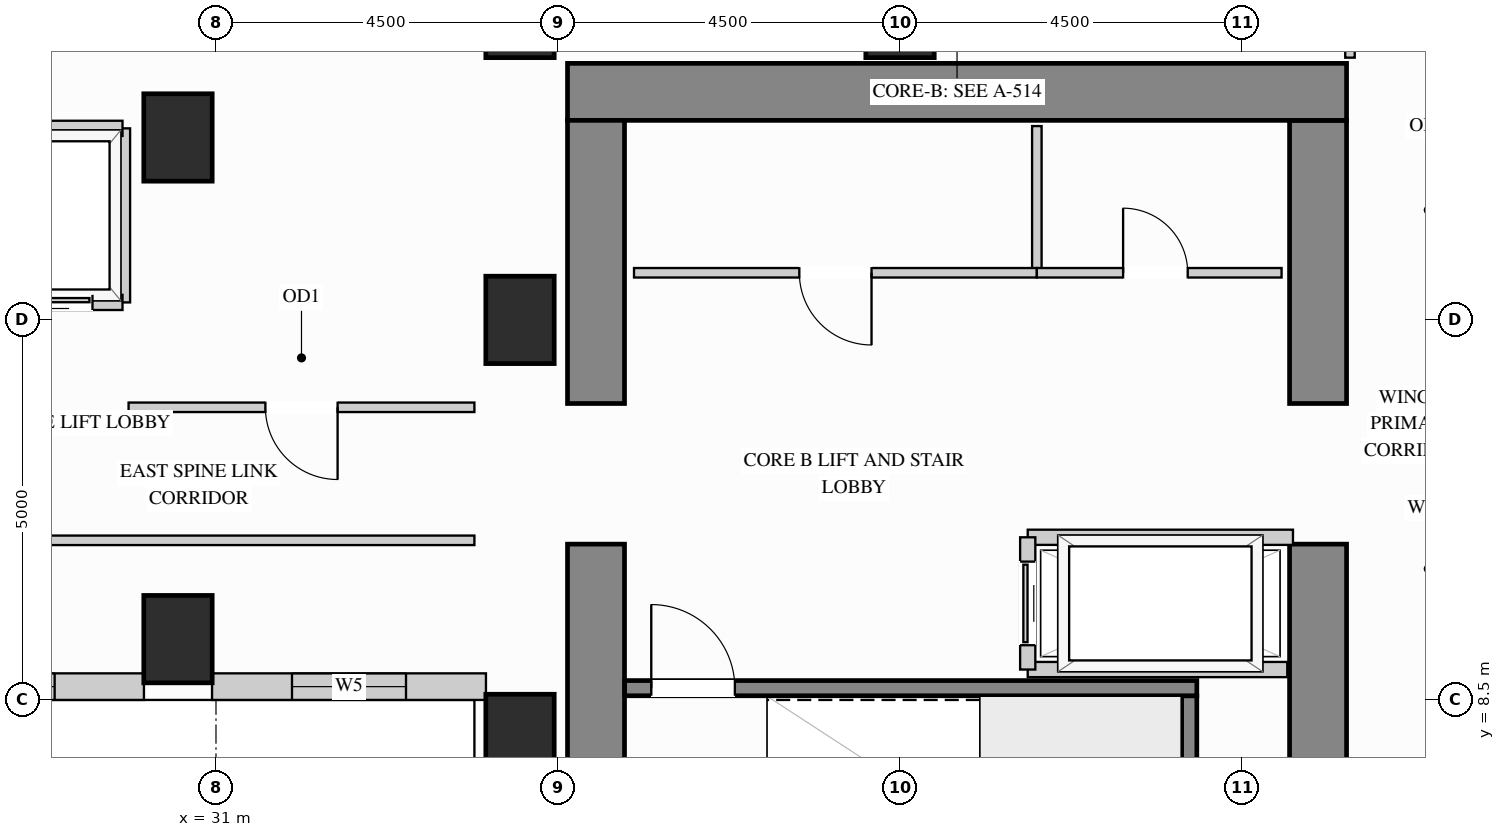
"""IFC4 building model, lengths in metres.
Left out: names, types, materials, properties, quantities, classifications, styles, units other than length and angle.
Written with IfcOpenShell. Run it as: python <this file> out.ifc"""

import sys

from ifc_helpers import new_model, si_unit, direction, frame, frame_2d, origin, origin_2d, place, context, subcontext, project, spatial, rectangle, extrude, source, transform, mapped, element, fill, save


model = new_model("IFC4")
c1 = context("Model", 3, precision=1e-05, world=origin(), true_north=direction((0.0, 1.0)))
c2 = subcontext(c1, "Body", "Model", "MODEL_VIEW")
j1 = project(units=[si_unit("LENGTHUNIT", "METRE"), si_unit("PLANEANGLEUNIT", "RADIAN")], contexts=[c1])
p1 = place(None, origin())
s1 = spatial("IfcSite", under=j1, at=p1, CompositionType="ELEMENT")
p2 = place(p1, origin())
s2 = spatial("IfcBuilding", under=s1, at=p2, CompositionType="ELEMENT")
p3 = place(p2, frame((0.0, 0.0, 131.4)))
s3 = spatial("IfcBuildingStorey", under=s2, at=p3, CompositionType="ELEMENT", Elevation=131.4)
m1 = source(origin(), c2, "Body", "SweptSolid", [
    extrude(rectangle(XDim=0.9, YDim=0.9, at=origin_2d()), origin(), (0.0, 0.0, 1.0), 3.38),
])
for number, where, z_axis, x_axis in (
    (1, (35.0, 17.4, 0.0), (0.0, 0.0, 1.0), (1.0, 0.0, 0.0)),
    (2, (40.0, 17.4, 0.0), (0.0, 0.0, 1.0), (1.0, 0.0, 0.0)),
):
    element("IfcColumn", number, at=place(p3, frame(where, z_axis=z_axis, x_axis=x_axis)), inside=s3, PredefinedType="COLUMN", context=c2, shape_type="MappedRepresentation", body=[
        mapped(m1, transform((0.0, 0.0, 0.0), x_axis=(1.0, 0.0, 0.0), y_axis=(0.0, 1.0, 0.0), z_axis=(0.0, 0.0, 1.0))),
    ])
m2 = source(origin(), c2, "Body", "SweptSolid", [
    extrude(rectangle(XDim=0.9, YDim=1.15, at=origin_2d()), origin(), (0.0, 0.0, 1.0), 3.38),
])
for number, where, z_axis, x_axis in (
    (3, (35.0, 13.5, 0.0), (0.0, 0.0, 1.0), (1.0, 0.0, 0.0)),
    (4, (35.0, 8.0, 0.0), (0.0, 0.0, 1.0), (1.0, 0.0, 0.0)),
    (5, (30.5, 15.9, 0.0), (0.0, 0.0, 1.0), (1.0, 0.0, 0.0)),
    (6, (30.5, 9.3, 0.0), (0.0, 0.0, 1.0), (1.0, 0.0, 0.0)),
):
    element("IfcColumn", number, at=place(p3, frame(where, z_axis=z_axis, x_axis=x_axis)), inside=s3, PredefinedType="COLUMN", context=c2, shape_type="MappedRepresentation", body=[
        mapped(m2, transform((0.0, 0.0, 0.0), x_axis=(1.0, 0.0, 0.0), y_axis=(0.0, 1.0, 0.0), z_axis=(0.0, 0.0, 1.0))),
    ])
m3 = source(origin(), c2, "Body", "SweptSolid", [
    extrude(rectangle(XDim=5.675, YDim=0.75, at=frame_2d((2.837, 0.0))), origin(), (0.0, 0.0, 1.0), 3.38),
])
p4 = place(p3, frame((45.5, 4.875, 0.0), z_axis=(0.0, 0.0, 1.0), x_axis=(0.0, 1.0, 0.0)))
e7 = element("IfcWall", 7, at=p4, inside=s3, PredefinedType="SHEAR", context=c2, shape_type="MappedRepresentation", body=[
    mapped(m3, transform((0.0, 0.0, 0.0), x_axis=(1.0, 0.0, 0.0), y_axis=(0.0, 1.0, 0.0), z_axis=(0.0, 0.0, 1.0))),
])
m4 = source(origin(), c2, "Body", "SweptSolid", [
    extrude(rectangle(XDim=3.725, YDim=0.75, at=frame_2d((1.863, 0.0))), origin(), (0.0, 0.0, 1.0), 3.38),
])
p5 = place(p3, frame((45.5, 12.4, 0.0), z_axis=(0.0, 0.0, 1.0), x_axis=(0.0, 1.0, 0.0)))
e8 = element("IfcWall", 8, at=p5, inside=s3, PredefinedType="SHEAR", context=c2, shape_type="MappedRepresentation", body=[
    mapped(m4, transform((0.0, 0.0, 0.0), x_axis=(1.0, 0.0, 0.0), y_axis=(0.0, 1.0, 0.0), z_axis=(0.0, 0.0, 1.0))),
])
m5 = source(origin(), c2, "Body", "SweptSolid", [
    extrude(rectangle(XDim=10.25, YDim=0.75, at=frame_2d((5.125, 0.0))), origin(), (0.0, 0.0, 1.0), 3.38),
])
p6 = place(p3, frame((35.625, 16.5, 0.0), z_axis=(0.0, 0.0, 1.0), x_axis=(1.0, 0.0, 0.0)))
e9 = element("IfcWall", 9, at=p6, inside=s3, PredefinedType="SHEAR", context=c2, shape_type="MappedRepresentation", body=[
    mapped(m5, transform((0.0, 0.0, 0.0), x_axis=(1.0, 0.0, 0.0), y_axis=(0.0, 1.0, 0.0), z_axis=(0.0, 0.0, 1.0))),
])
p7 = place(p3, frame((36.0, 4.875, 0.0), z_axis=(0.0, 0.0, 1.0), x_axis=(0.0, 1.0, 0.0)))
e10 = element("IfcWall", 10, at=p7, inside=s3, PredefinedType="SHEAR", context=c2, shape_type="MappedRepresentation", body=[
    mapped(m3, transform((0.0, 0.0, 0.0), x_axis=(1.0, 0.0, 0.0), y_axis=(0.0, 1.0, 0.0), z_axis=(0.0, 0.0, 1.0))),
])
p8 = place(p3, frame((36.0, 12.4, 0.0), z_axis=(0.0, 0.0, 1.0), x_axis=(0.0, 1.0, 0.0)))
e11 = element("IfcWall", 11, at=p8, inside=s3, PredefinedType="SHEAR", context=c2, shape_type="MappedRepresentation", body=[
    mapped(m4, transform((0.0, 0.0, 0.0), x_axis=(1.0, 0.0, 0.0), y_axis=(0.0, 1.0, 0.0), z_axis=(0.0, 0.0, 1.0))),
])
p9 = place(p3, frame((23.848, 8.675, 0.0), z_axis=(0.0, 0.0, 1.0), x_axis=(1.0, 0.0, 0.0)))
e12 = element("IfcWall", 12, at=p9, inside=s3, PredefinedType="SOLIDWALL", context=c2, shape_type="SweptSolid", body=[
    extrude(rectangle(XDim=6.204, YDim=0.35, at=frame_2d((3.102, 0.0))), origin(), (0.0, 0.0, 1.0), 3.365),
])
p10 = place(p9, frame((1.175, 0.0, 0.78)))
e13 = element("IfcOpeningElement", 13, at=p10, cuts=e12, PredefinedType="OPENING", context=c2, shape_type="SweptSolid", body=[
    extrude(rectangle(XDim=1.5, YDim=2.0, at=frame_2d((0.75, 1.0))), frame((0.0, 0.185, 0.0), z_axis=(0.0, -1.0, 0.0), x_axis=(1.0, 0.0, 0.0)), (0.0, 0.0, 1.0), 0.37),
])
p11 = place(p9, frame((3.529, 0.0, 0.78)))
e14 = element("IfcOpeningElement", 14, at=p11, cuts=e12, PredefinedType="OPENING", context=c2, shape_type="SweptSolid", body=[
    extrude(rectangle(XDim=1.5, YDim=2.0, at=frame_2d((0.75, 1.0))), frame((0.0, 0.185, 0.0), z_axis=(0.0, -1.0, 0.0), x_axis=(1.0, 0.0, 0.0)), (0.0, 0.0, 1.0), 0.37),
])
p12 = place(p3, frame((30.948, 8.675, 0.0), z_axis=(0.0, 0.0, 1.0), x_axis=(1.0, 0.0, 0.0)))
e15 = element("IfcWall", 15, at=p12, inside=s3, PredefinedType="SOLIDWALL", context=c2, shape_type="SweptSolid", body=[
    extrude(rectangle(XDim=3.604, YDim=0.35, at=frame_2d((1.802, 0.0))), origin(), (0.0, 0.0, 1.0), 3.365),
])
p13 = place(p12, frame((1.052, 0.0, 0.78)))
e16 = element("IfcOpeningElement", 16, at=p13, cuts=e15, PredefinedType="OPENING", context=c2, shape_type="SweptSolid", body=[
    extrude(rectangle(XDim=1.5, YDim=2.0, at=frame_2d((0.75, 1.0))), frame((0.0, 0.185, 0.0), z_axis=(0.0, -1.0, 0.0), x_axis=(1.0, 0.0, 0.0)), (0.0, 0.0, 1.0), 0.37),
])
m6 = source(origin(), c2, "Body", "SweptSolid", [
    extrude(rectangle(XDim=1.93, YDim=0.125, at=frame_2d((0.965, 0.0))), origin(), (0.0, 0.0, 1.0), 3.365),
])
p14 = place(p3, frame((41.8, 14.12, 0.0), z_axis=(0.0, 0.0, 1.0), x_axis=(0.0, 1.0, 0.0)))
e17 = element("IfcWall", 17, at=p14, inside=s3, PredefinedType="PARTITIONING", context=c2, shape_type="MappedRepresentation", body=[
    mapped(m6, transform((0.0, 0.0, 0.0), x_axis=(1.0, 0.0, 0.0), y_axis=(0.0, 1.0, 0.0), z_axis=(0.0, 0.0, 1.0))),
])
p15 = place(p3, frame((36.5, 14.12, 0.0), z_axis=(0.0, 0.0, 1.0), x_axis=(1.0, 0.0, 0.0)))
e18 = element("IfcWall", 18, at=p15, inside=s3, PredefinedType="PARTITIONING", context=c2, shape_type="SweptSolid", body=[
    extrude(rectangle(XDim=5.3, YDim=0.125, at=frame_2d((2.65, 0.0))), origin(), (0.0, 0.0, 1.0), 3.365),
])
p16 = place(p15, frame((2.175, 0.0, 0.0)))
e19 = element("IfcOpeningElement", 19, at=p16, cuts=e18, PredefinedType="OPENING", context=c2, shape_type="SweptSolid", body=[
    extrude(rectangle(XDim=0.95, YDim=2.15, at=frame_2d((0.475, 1.075))), frame((0.0, 0.073, 0.0), z_axis=(0.0, -1.0, 0.0), x_axis=(1.0, 0.0, 0.0)), (0.0, 0.0, 1.0), 0.145),
])
p17 = place(p3, frame((41.8, 14.12, 0.0), z_axis=(0.0, 0.0, 1.0), x_axis=(1.0, 0.0, 0.0)))
e20 = element("IfcWall", 20, at=p17, inside=s3, PredefinedType="PARTITIONING", context=c2, shape_type="SweptSolid", body=[
    extrude(rectangle(XDim=3.22, YDim=0.125, at=frame_2d((1.61, 0.0))), origin(), (0.0, 0.0, 1.0), 3.365),
])
p18 = place(p17, frame((1.135, 0.0, 0.0)))
e21 = element("IfcOpeningElement", 21, at=p18, cuts=e20, PredefinedType="OPENING", context=c2, shape_type="SweptSolid", body=[
    extrude(rectangle(XDim=0.85, YDim=2.1, at=frame_2d((0.425, 1.05))), frame((0.0, 0.073, 0.0), z_axis=(0.0, -1.0, 0.0), x_axis=(1.0, 0.0, 0.0)), (0.0, 0.0, 1.0), 0.145),
])
p19 = place(p3, frame((45.92, 16.95, 0.0), z_axis=(0.0, 0.0, 1.0), x_axis=(0.0, 1.0, 0.0)))
e22 = element("IfcWall", 22, at=p19, inside=s3, PredefinedType="PARTITIONING", context=c2, shape_type="SweptSolid", body=[
    extrude(rectangle(XDim=2.9, YDim=0.125, at=frame_2d((1.45, 0.0))), origin(), (0.0, 0.0, 1.0), 3.365),
])
p20 = place(p19, frame((1.543, 0.0, 0.0)))
e23 = element("IfcOpeningElement", 23, at=p20, cuts=e22, PredefinedType="OPENING", context=c2, shape_type="SweptSolid", body=[
    extrude(rectangle(XDim=0.95, YDim=2.15, at=frame_2d((0.475, 1.075))), frame((0.0, 0.073, 0.0), z_axis=(0.0, -1.0, 0.0), x_axis=(1.0, 0.0, 0.0)), (0.0, 0.0, 1.0), 0.145),
])
p21 = place(p3, frame((29.85, 12.35, 0.0), z_axis=(0.0, 0.0, 1.0), x_axis=(1.0, 0.0, 0.0)))
e24 = element("IfcWall", 24, at=p21, inside=s3, PredefinedType="PARTITIONING", context=c2, shape_type="SweptSolid", body=[
    extrude(rectangle(XDim=4.55, YDim=0.125, at=frame_2d((2.275, 0.0))), origin(), (0.0, 0.0, 1.0), 3.365),
])
p22 = place(p21, frame((1.8, 0.0, 0.0)))
e25 = element("IfcOpeningElement", 25, at=p22, cuts=e24, PredefinedType="OPENING", context=c2, shape_type="SweptSolid", body=[
    extrude(rectangle(XDim=0.95, YDim=2.15, at=frame_2d((0.475, 1.075))), frame((0.0, 0.073, 0.0), z_axis=(0.0, -1.0, 0.0), x_axis=(1.0, 0.0, 0.0)), (0.0, 0.0, 1.0), 0.145),
])
p23 = place(p3, frame((19.5, 10.6, 0.0), z_axis=(0.0, 0.0, 1.0), x_axis=(1.0, 0.0, 0.0)))
e26 = element("IfcWall", 26, at=p23, inside=s3, PredefinedType="PARTITIONING", context=c2, shape_type="SweptSolid", body=[
    extrude(rectangle(XDim=14.9, YDim=0.125, at=frame_2d((7.45, 0.0))), origin(), (0.0, 0.0, 1.0), 3.365),
])
p24 = place(p23, frame((6.975, 0.0, 0.0)))
e27 = element("IfcOpeningElement", 27, at=p24, cuts=e26, PredefinedType="OPENING", context=c2, shape_type="SweptSolid", body=[
    extrude(rectangle(XDim=0.95, YDim=2.15, at=frame_2d((0.475, 1.075))), frame((0.0, 0.073, 0.0), z_axis=(0.0, -1.0, 0.0), x_axis=(1.0, 0.0, 0.0)), (0.0, 0.0, 1.0), 0.145),
])
m7 = source(origin(), c2, "Body", "SweptSolid", [
    extrude(rectangle(XDim=2.29, YDim=0.2, at=frame_2d((1.145, 0.0))), origin(), (0.0, 0.0, 1.0), 3.365),
])
p25 = place(p3, frame((29.77, 13.73, 0.0), z_axis=(0.0, 0.0, 1.0), x_axis=(0.0, 1.0, 0.0)))
e28 = element("IfcWall", 28, at=p25, inside=s3, PredefinedType="PARTITIONING", context=c2, shape_type="MappedRepresentation", body=[
    mapped(m7, transform((0.0, 0.0, 0.0), x_axis=(1.0, 0.0, 0.0), y_axis=(0.0, 1.0, 0.0), z_axis=(0.0, 0.0, 1.0))),
])
m8 = source(origin(), c2, "Body", "SweptSolid", [
    extrude(rectangle(XDim=1.89, YDim=0.2, at=frame_2d((0.945, 0.0))), origin(), (0.0, 0.0, 1.0), 2.677),
])
p26 = place(p3, frame((27.88, 16.02, 0.0), z_axis=(0.0, 0.0, 1.0), x_axis=(1.0, 0.0, 0.0)))
e29 = element("IfcWall", 29, at=p26, inside=s3, PredefinedType="PARTITIONING", context=c2, shape_type="MappedRepresentation", body=[
    mapped(m8, transform((0.0, 0.0, 0.0), x_axis=(1.0, 0.0, 0.0), y_axis=(0.0, 1.0, 0.0), z_axis=(0.0, 0.0, 1.0))),
])
p27 = place(p3, frame((27.88, 13.73, 0.0), z_axis=(0.0, 0.0, 1.0), x_axis=(1.0, 0.0, 0.0)))
e30 = element("IfcWall", 30, at=p27, inside=s3, PredefinedType="PARTITIONING", context=c2, shape_type="SweptSolid", body=[
    extrude(rectangle(XDim=1.89, YDim=0.2, at=frame_2d((0.945, 0.0))), origin(), (0.0, 0.0, 1.0), 2.446),
])
p28 = place(p27, frame((0.395, 0.0, 0.0)))
e31 = element("IfcOpeningElement", 31, at=p28, cuts=e30, PredefinedType="OPENING", context=c2, shape_type="SweptSolid", body=[
    extrude(rectangle(XDim=1.1, YDim=2.2, at=frame_2d((0.55, 1.1))), frame((0.0, 0.11, 0.0), z_axis=(0.0, -1.0, 0.0), x_axis=(1.0, 0.0, 0.0)), (0.0, 0.0, 1.0), 0.22),
])
m9 = source(origin(), c2, "Body", "SweptSolid", [
    extrude(rectangle(XDim=3.49, YDim=0.2, at=frame_2d((1.745, 0.0))), origin(), (0.0, 0.0, 1.0), 3.365),
])
p29 = place(p3, frame((41.68, 10.64, 0.0), z_axis=(0.0, 0.0, 1.0), x_axis=(1.0, 0.0, 0.0)))
e32 = element("IfcWall", 32, at=p29, inside=s3, PredefinedType="PARTITIONING", context=c2, shape_type="MappedRepresentation", body=[
    mapped(m9, transform((0.0, 0.0, 0.0), x_axis=(1.0, 0.0, 0.0), y_axis=(0.0, 1.0, 0.0), z_axis=(0.0, 0.0, 1.0))),
])
m10 = source(origin(), c2, "Body", "SweptSolid", [
    extrude(rectangle(XDim=3.415, YDim=0.2, at=frame_2d((1.708, 0.0))), origin(), (0.0, 0.0, 1.0), 3.365),
])
p30 = place(p3, frame((41.68, 8.9, 0.0), z_axis=(0.0, 0.0, 1.0), x_axis=(1.0, 0.0, 0.0)))
e33 = element("IfcWall", 33, at=p30, inside=s3, PredefinedType="PARTITIONING", context=c2, shape_type="MappedRepresentation", body=[
    mapped(m10, transform((0.0, 0.0, 0.0), x_axis=(1.0, 0.0, 0.0), y_axis=(0.0, 1.0, 0.0), z_axis=(0.0, 0.0, 1.0))),
])
p31 = place(p3, frame((41.68, 8.9, 0.0), z_axis=(0.0, 0.0, 1.0), x_axis=(0.0, 1.0, 0.0)))
e34 = element("IfcWall", 34, at=p31, inside=s3, PredefinedType="PARTITIONING", context=c2, shape_type="SweptSolid", body=[
    extrude(rectangle(XDim=1.74, YDim=0.2, at=frame_2d((0.87, 0.0))), origin(), (0.0, 0.0, 1.0), 3.365),
])
p32 = place(p31, frame((0.32, 0.0, 0.0)))
e35 = element("IfcOpeningElement", 35, at=p32, cuts=e34, PredefinedType="OPENING", context=c2, shape_type="SweptSolid", body=[
    extrude(rectangle(XDim=1.1, YDim=2.2, at=frame_2d((0.55, 1.1))), frame((0.0, 0.11, 0.0), z_axis=(0.0, -1.0, 0.0), x_axis=(1.0, 0.0, 0.0)), (0.0, 0.0, 1.0), 0.22),
])
m11 = source(origin(), c2, "Body", "SweptSolid", [
    extrude(rectangle(XDim=3.678, YDim=0.2, at=frame_2d((1.839, 0.0))), origin(), (0.0, 0.0, 1.0), 3.38),
])
p33 = place(p3, frame((43.805, 4.877, 0.0), z_axis=(0.0, 0.0, 1.0), x_axis=(0.0, 1.0, 0.0)))
e36 = element("IfcWall", 36, at=p33, inside=s3, PredefinedType="SHEAR", context=c2, shape_type="MappedRepresentation", body=[
    mapped(m11, transform((0.0, 0.0, 0.0), x_axis=(1.0, 0.0, 0.0), y_axis=(0.0, 1.0, 0.0), z_axis=(0.0, 0.0, 1.0))),
])
p34 = place(p3, frame((36.377, 8.655, 0.0), z_axis=(0.0, 0.0, 1.0), x_axis=(1.0, 0.0, 0.0)))
e37 = element("IfcWall", 37, at=p34, inside=s3, PredefinedType="SHEAR", context=c2, shape_type="SweptSolid", body=[
    extrude(rectangle(XDim=7.528, YDim=0.2, at=frame_2d((3.764, 0.0))), origin(), (0.0, 0.0, 1.0), 3.38),
])
p35 = place(p34, frame((0.35, 0.0, 0.0)))
e38 = element("IfcOpeningElement", 38, at=p35, cuts=e37, PredefinedType="OPENING", context=c2, shape_type="SweptSolid", body=[
    extrude(rectangle(XDim=1.1, YDim=2.15, at=frame_2d((0.55, 1.075))), frame((0.0, 0.11, 0.0), z_axis=(0.0, -1.0, 0.0), x_axis=(1.0, 0.0, 0.0)), (0.0, 0.0, 1.0), 0.22),
])
m12 = source(origin(), c2, "Body", "SweptSolid", [
    extrude(rectangle(XDim=1.1, YDim=2.2, at=frame_2d((0.55, 1.1))), frame((0.0, 0.025, 0.0), z_axis=(0.0, -1.0, 0.0), x_axis=(1.0, 0.0, 0.0)), (0.0, 0.0, 1.0), 0.05),
])
p36 = place(p28, origin())
e39 = element("IfcDoor", 39, at=p36, inside=s3, OperationType="SLIDING_TO_LEFT", PredefinedType="DOOR", context=c2, shape_type="MappedRepresentation", body=[
    mapped(m12, transform((0.0, 0.0, 0.0), x_axis=(1.0, 0.0, 0.0), y_axis=(0.0, 1.0, 0.0), z_axis=(0.0, 0.0, 1.0))),
])
fill(e31, e39)
p37 = place(p32, origin())
e40 = element("IfcDoor", 40, at=p37, inside=s3, OperationType="SLIDING_TO_LEFT", PredefinedType="DOOR", context=c2, shape_type="MappedRepresentation", body=[
    mapped(m12, transform((0.0, 0.0, 0.0), x_axis=(1.0, 0.0, 0.0), y_axis=(0.0, 1.0, 0.0), z_axis=(0.0, 0.0, 1.0))),
])
fill(e35, e40)
m13 = source(origin(), c2, "Body", "SweptSolid", [
    extrude(rectangle(XDim=0.95, YDim=2.15, at=frame_2d((0.475, 1.075))), frame((0.0, 0.025, 0.0), z_axis=(0.0, -1.0, 0.0), x_axis=(1.0, 0.0, 0.0)), (0.0, 0.0, 1.0), 0.05),
])
p38 = place(p16, origin())
e41 = element("IfcDoor", 41, at=p38, inside=s3, OperationType="SINGLE_SWING_RIGHT", PredefinedType="DOOR", context=c2, shape_type="MappedRepresentation", body=[
    mapped(m13, transform((0.0, 0.0, 0.0), x_axis=(1.0, 0.0, 0.0), y_axis=(0.0, 1.0, 0.0), z_axis=(0.0, 0.0, 1.0))),
])
fill(e19, e41)
p39 = place(p22, origin())
e42 = element("IfcDoor", 42, at=p39, inside=s3, OperationType="SINGLE_SWING_RIGHT", PredefinedType="DOOR", context=c2, shape_type="MappedRepresentation", body=[
    mapped(m13, transform((0.0, 0.0, 0.0), x_axis=(1.0, 0.0, 0.0), y_axis=(0.0, 1.0, 0.0), z_axis=(0.0, 0.0, 1.0))),
])
fill(e25, e42)
m14 = source(origin(), c2, "Body", "SweptSolid", [
    extrude(rectangle(XDim=0.85, YDim=2.1, at=frame_2d((0.425, 1.05))), frame((0.0, 0.025, 0.0), z_axis=(0.0, -1.0, 0.0), x_axis=(1.0, 0.0, 0.0)), (0.0, 0.0, 1.0), 0.05),
])
p40 = place(p18, origin())
e43 = element("IfcDoor", 43, at=p40, inside=s3, OperationType="SINGLE_SWING_LEFT", PredefinedType="DOOR", context=c2, shape_type="MappedRepresentation", body=[
    mapped(m14, transform((0.0, 0.0, 0.0), x_axis=(1.0, 0.0, 0.0), y_axis=(0.0, 1.0, 0.0), z_axis=(0.0, 0.0, 1.0))),
])
fill(e21, e43)
m15 = source(origin(), c2, "Body", "SweptSolid", [
    extrude(rectangle(XDim=1.1, YDim=2.15, at=frame_2d((0.55, 1.075))), frame((0.0, 0.025, 0.0), z_axis=(0.0, -1.0, 0.0), x_axis=(1.0, 0.0, 0.0)), (0.0, 0.0, 1.0), 0.05),
])
p41 = place(p35, origin())
e44 = element("IfcDoor", 44, at=p41, inside=s3, OperationType="SINGLE_SWING_LEFT", PredefinedType="DOOR", context=c2, shape_type="MappedRepresentation", body=[
    mapped(m15, transform((0.0, 0.0, 0.0), x_axis=(1.0, 0.0, 0.0), y_axis=(0.0, 1.0, 0.0), z_axis=(0.0, 0.0, 1.0))),
])
fill(e38, e44)
m16 = source(origin(), c2, "Body", "SweptSolid", [
    extrude(rectangle(XDim=1.5, YDim=2.0, at=frame_2d((0.75, 1.0))), frame((0.0, 0.03, 0.0), z_axis=(0.0, -1.0, 0.0), x_axis=(1.0, 0.0, 0.0)), (0.0, 0.0, 1.0), 0.06),
])
p42 = place(p11, origin())
e45 = element("IfcWindow", 45, at=p42, inside=s3, PartitioningType="SINGLE_PANEL", PredefinedType="WINDOW", context=c2, shape_type="MappedRepresentation", body=[
    mapped(m16, transform((0.0, 0.0, 0.0), x_axis=(1.0, 0.0, 0.0), y_axis=(0.0, 1.0, 0.0), z_axis=(0.0, 0.0, 1.0))),
])
fill(e14, e45)
p43 = place(p13, origin())
e46 = element("IfcWindow", 46, at=p43, inside=s3, PartitioningType="SINGLE_PANEL", PredefinedType="WINDOW", context=c2, shape_type="MappedRepresentation", body=[
    mapped(m16, transform((0.0, 0.0, 0.0), x_axis=(1.0, 0.0, 0.0), y_axis=(0.0, 1.0, 0.0), z_axis=(0.0, 0.0, 1.0))),
])
fill(e16, e46)
save(model, sys.argv[1])
